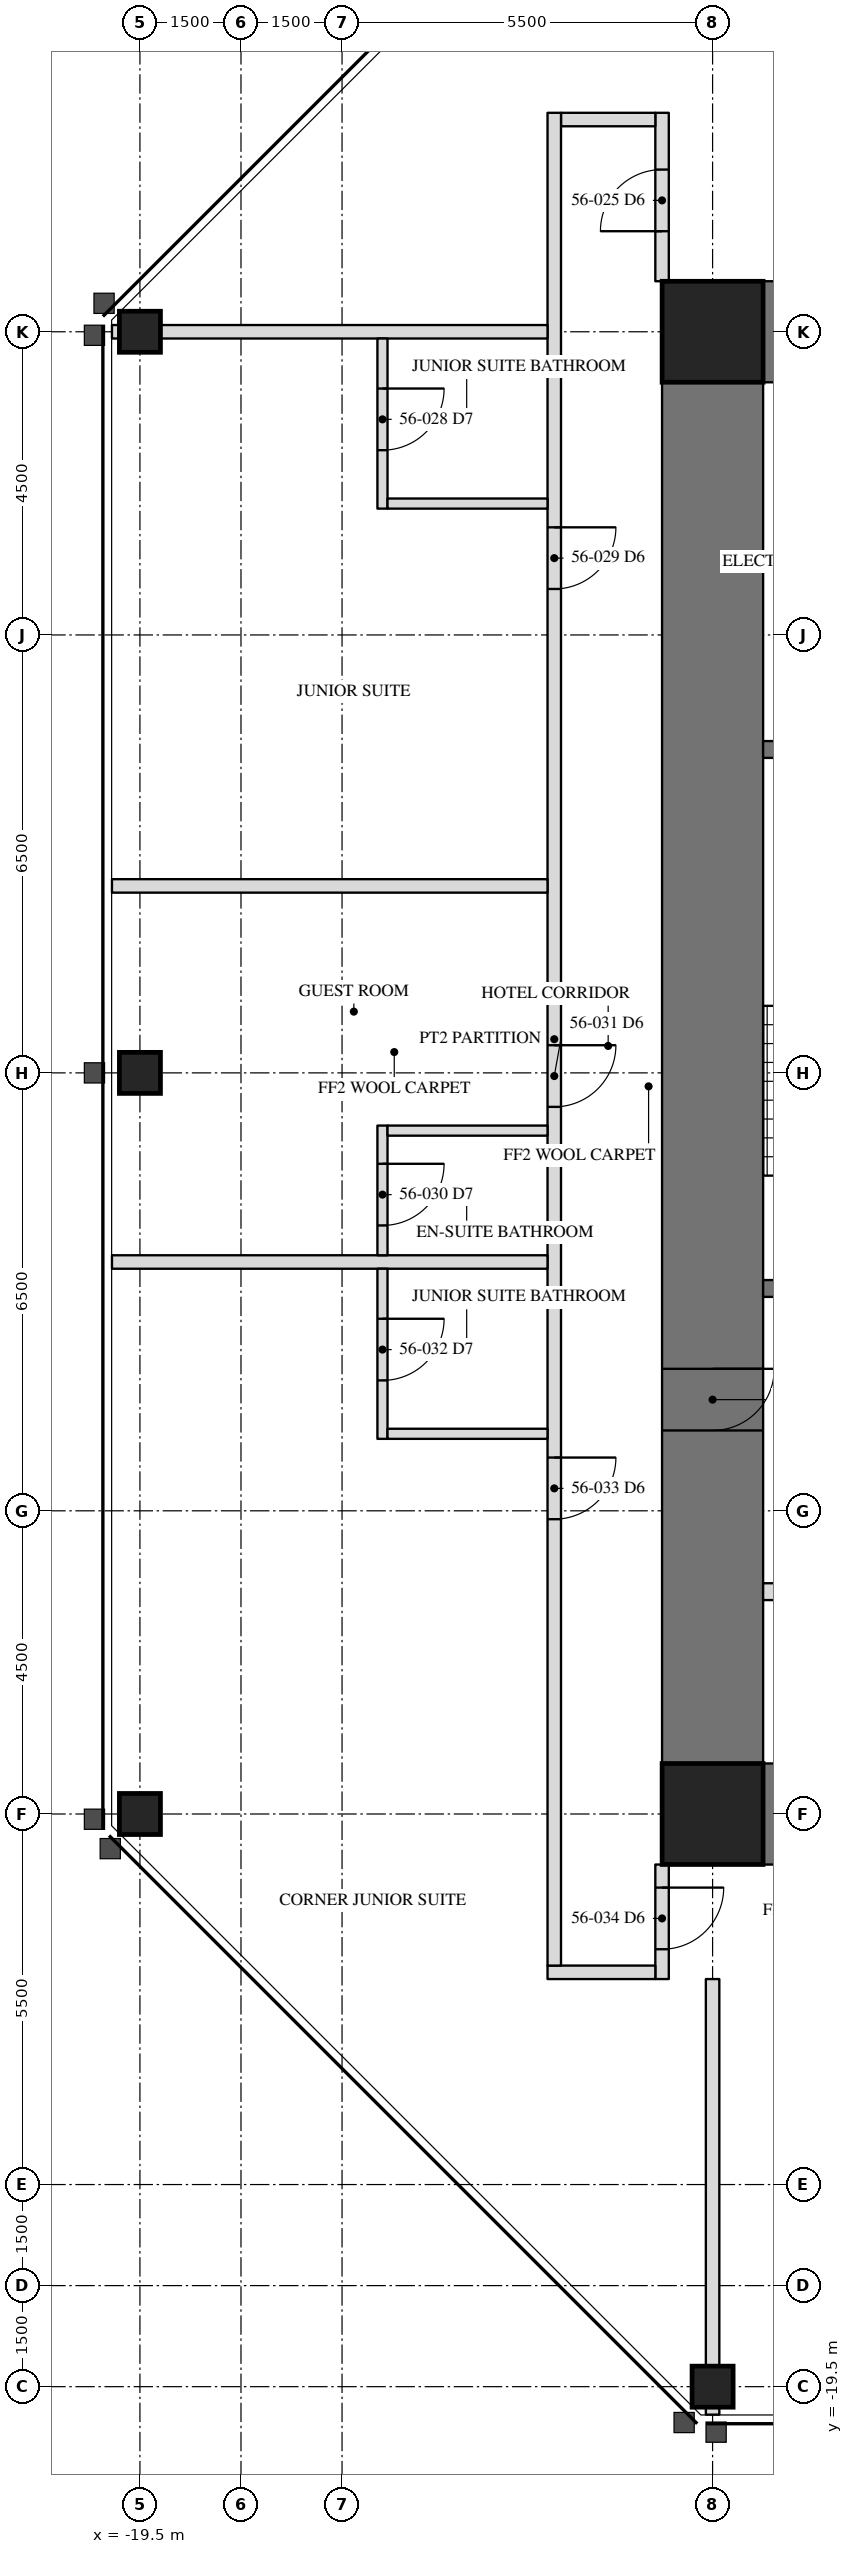
"""IFC4 building model, lengths in metres.
Left out: names, types, materials, properties, quantities, classifications, styles, units other than length and angle.
Written with IfcOpenShell. Run it as: python <this file> out.ifc"""

import sys

from ifc_helpers import new_model, si_unit, direction, frame, frame_2d, origin, origin_2d, place, context, subcontext, project, spatial, rectangle, hollow_rectangle, extrude, element, fill, save


model = new_model("IFC4")
c1 = context("Model", 3, precision=1e-05, world=origin(), true_north=direction((0.0, 1.0)))
c2 = subcontext(c1, "Body", "Model", "MODEL_VIEW")
j1 = project(units=[si_unit("LENGTHUNIT", "METRE"), si_unit("PLANEANGLEUNIT", "RADIAN")], contexts=[c1])
p1 = place(None, origin())
s1 = spatial("IfcSite", under=j1, at=p1, CompositionType="ELEMENT")
p2 = place(p1, origin())
s2 = spatial("IfcBuilding", under=s1, at=p2, CompositionType="ELEMENT")
p3 = place(p2, frame((0.0, 0.0, 232.7)))
s3 = spatial("IfcBuildingStorey", under=s2, at=p3, CompositionType="ELEMENT", Elevation=232.7)
for number, where, z_axis, x_axis in (
    (1, (-19.5, 0.0, 0.0), (0.0, 0.0, 1.0), (0.0, 1.0, 0.0)),
    (2, (-19.5, -11.0, 0.0), (0.0, 0.0, 1.0), (0.0, 1.0, 0.0)),
    (3, (-11.0, -19.5, 0.0), (0.0, 0.0, 1.0), (1.0, 0.0, 0.0)),
    (4, (-19.5, 11.0, 0.0), (0.0, 0.0, 1.0), (0.0, 1.0, 0.0)),
):
    element("IfcColumn", number, at=place(p3, frame(where, z_axis=z_axis, x_axis=x_axis)), inside=s3, PredefinedType="COLUMN", context=c2, shape_type="SweptSolid", body=[
        extrude(hollow_rectangle(XDim=0.61, YDim=0.61, WallThickness=0.076, at=origin_2d()), origin(), (0.0, 0.0, 1.0), 3.5),
    ])
p4 = place(p3, frame((-11.0, 11.0, 0.0), z_axis=(0.0, 0.0, 1.0), x_axis=(0.0, -1.0, 0.0)))
e5 = element("IfcWall", 5, at=p4, inside=s3, PredefinedType="SHEAR", context=c2, shape_type="SweptSolid", body=[
    extrude(rectangle(XDim=22.0, YDim=1.5, at=frame_2d((11.0, 0.0))), origin(), (0.0, 0.0, 1.0), 3.5),
])
p5 = place(p4, frame((15.393, 0.0, 0.0)))
e6 = element("IfcOpeningElement", 6, at=p5, cuts=e5, PredefinedType="OPENING", context=c2, shape_type="SweptSolid", body=[
    extrude(rectangle(XDim=0.915, YDim=2.134, at=frame_2d((0.458, 1.067))), frame((0.0, 0.76, 0.0), z_axis=(0.0, -1.0, 0.0), x_axis=(1.0, 0.0, 0.0)), (0.0, 0.0, 1.0), 1.52),
])
for number, where, z_axis, x_axis in (
    (7, (-6.5, 11.0, 0.0), (0.0, 0.0, 1.0), (-1.0, 0.0, 0.0)),
    (8, (-11.0, -11.0, 0.0), (0.0, 0.0, 1.0), (1.0, 0.0, 0.0)),
):
    element("IfcWall", number, at=place(p3, frame(where, z_axis=z_axis, x_axis=x_axis)), inside=s3, PredefinedType="SHEAR", context=c2, shape_type="SweptSolid", body=[
        extrude(rectangle(XDim=4.5, YDim=1.5, at=frame_2d((2.25, 0.0))), origin(), (0.0, 0.0, 1.0), 3.5),
    ])
for number, where, z_axis, x_axis in (
    (9, (-11.0, 11.0, 0.0), (0.0, 0.0, 1.0), (1.0, 0.0, 0.0)),
    (10, (-11.0, -11.0, 0.0), (0.0, 0.0, 1.0), (1.0, 0.0, 0.0)),
):
    element("IfcColumn", number, at=place(p3, frame(where, z_axis=z_axis, x_axis=x_axis)), inside=s3, PredefinedType="COLUMN", context=c2, shape_type="SweptSolid", body=[
        extrude(hollow_rectangle(XDim=1.499, YDim=1.499, WallThickness=0.102, at=origin_2d()), origin(), (0.0, 0.0, 1.0), 3.5),
    ])
p6 = place(p3, frame((-6.95, 4.8, 0.0), z_axis=(0.0, 0.0, 1.0), x_axis=(-1.0, 0.0, 0.0)))
e11 = element("IfcWall", 11, at=p6, inside=s3, PredefinedType="SOLIDWALL", context=c2, shape_type="SweptSolid", body=[
    extrude(rectangle(XDim=3.3, YDim=0.25, at=frame_2d((1.65, 0.0))), origin(), (0.0, 0.0, 1.0), 3.31),
])
p7 = place(p3, frame((-6.95, -3.2, 0.0), z_axis=(0.0, 0.0, 1.0), x_axis=(-1.0, 0.0, 0.0)))
e12 = element("IfcWall", 12, at=p7, inside=s3, PredefinedType="SOLIDWALL", context=c2, shape_type="SweptSolid", body=[
    extrude(rectangle(XDim=3.3, YDim=0.25, at=frame_2d((1.65, 0.0))), origin(), (0.0, 0.0, 1.0), 3.31),
])
p8 = place(p7, frame((1.116, 0.0, 0.0)))
e13 = element("IfcOpeningElement", 13, at=p8, cuts=e12, PredefinedType="OPENING", context=c2, shape_type="SweptSolid", body=[
    extrude(rectangle(XDim=1.067, YDim=2.134, at=frame_2d((0.533, 1.067))), frame((0.0, 0.135, 0.0), z_axis=(0.0, -1.0, 0.0), x_axis=(1.0, 0.0, 0.0)), (0.0, 0.0, 1.0), 0.27),
])
p9 = place(p3, frame((-6.95, -7.7, 0.0), z_axis=(0.0, 0.0, 1.0), x_axis=(-1.0, 0.0, 0.0)))
e14 = element("IfcWall", 14, at=p9, inside=s3, PredefinedType="PARTITIONING", context=c2, shape_type="SweptSolid", body=[
    extrude(rectangle(XDim=3.3, YDim=0.25, at=frame_2d((1.65, 0.0))), origin(), (0.0, 0.0, 1.0), 3.31),
])
p10 = place(p9, frame((0.45, 0.0, 0.0)))
e15 = element("IfcOpeningElement", 15, at=p10, cuts=e14, PredefinedType="OPENING", context=c2, shape_type="SweptSolid", body=[
    extrude(rectangle(XDim=1.219, YDim=2.134, at=frame_2d((0.609, 1.067))), frame((0.0, 0.135, 0.0), z_axis=(0.0, -1.0, 0.0), x_axis=(1.0, 0.0, 0.0)), (0.0, 0.0, 1.0), 0.27),
])
p11 = place(p3, frame((-11.75, 11.75, 0.0), z_axis=(0.0, 0.0, 1.0), x_axis=(0.0, 1.0, 0.0)))
e16 = element("IfcWall", 16, at=p11, inside=s3, PredefinedType="PARTITIONING", context=c2, shape_type="SweptSolid", body=[
    extrude(rectangle(XDim=2.5, YDim=0.2, at=frame_2d((1.25, 0.0))), origin(), (0.0, 0.0, 1.0), 3.31),
])
p12 = place(p11, frame((0.742, 0.0, 0.0)))
e17 = element("IfcOpeningElement", 17, at=p12, cuts=e16, PredefinedType="OPENING", context=c2, shape_type="SweptSolid", body=[
    extrude(rectangle(XDim=0.915, YDim=2.134, at=frame_2d((0.458, 1.067))), frame((0.0, 0.11, 0.0), z_axis=(0.0, -1.0, 0.0), x_axis=(1.0, 0.0, 0.0)), (0.0, 0.0, 1.0), 0.22),
])
p13 = place(p3, frame((-11.85, 14.15, 0.0), z_axis=(0.0, 0.0, 1.0), x_axis=(-1.0, 0.0, 0.0)))
e18 = element("IfcWall", 18, at=p13, inside=s3, PredefinedType="PARTITIONING", context=c2, shape_type="SweptSolid", body=[
    extrude(rectangle(XDim=1.4, YDim=0.2, at=frame_2d((0.7, 0.0))), origin(), (0.0, 0.0, 1.0), 3.31),
])
p14 = place(p3, frame((-11.75, -11.75, 0.0), z_axis=(0.0, 0.0, 1.0), x_axis=(0.0, -1.0, 0.0)))
e19 = element("IfcWall", 19, at=p14, inside=s3, PredefinedType="PARTITIONING", context=c2, shape_type="SweptSolid", body=[
    extrude(rectangle(XDim=1.7, YDim=0.2, at=frame_2d((0.85, 0.0))), origin(), (0.0, 0.0, 1.0), 3.31),
])
p15 = place(p14, frame((0.343, 0.0, 0.0)))
e20 = element("IfcOpeningElement", 20, at=p15, cuts=e19, PredefinedType="OPENING", context=c2, shape_type="SweptSolid", body=[
    extrude(rectangle(XDim=0.915, YDim=2.134, at=frame_2d((0.458, 1.067))), frame((0.0, 0.11, 0.0), z_axis=(0.0, -1.0, 0.0), x_axis=(1.0, 0.0, 0.0)), (0.0, 0.0, 1.0), 0.22),
])
p16 = place(p3, frame((-13.45, -13.35, 0.0), z_axis=(0.0, 0.0, 1.0), x_axis=(1.0, 0.0, 0.0)))
e21 = element("IfcWall", 21, at=p16, inside=s3, PredefinedType="PARTITIONING", context=c2, shape_type="SweptSolid", body=[
    extrude(rectangle(XDim=1.6, YDim=0.2, at=frame_2d((0.8, 0.0))), origin(), (0.0, 0.0, 1.0), 3.31),
])
p17 = place(p3, frame((-13.35, 14.25, 0.0), z_axis=(0.0, 0.0, 1.0), x_axis=(0.0, -1.0, 0.0)))
e22 = element("IfcWall", 22, at=p17, inside=s3, PredefinedType="PARTITIONING", context=c2, shape_type="SweptSolid", body=[
    extrude(rectangle(XDim=27.5, YDim=0.2, at=frame_2d((13.75, 0.0))), origin(), (0.0, 0.0, 1.0), 3.31),
])
p18 = place(p17, frame((6.153, 0.0, 0.0)))
e23 = element("IfcOpeningElement", 23, at=p18, cuts=e22, PredefinedType="OPENING", context=c2, shape_type="SweptSolid", body=[
    extrude(rectangle(XDim=0.915, YDim=2.134, at=frame_2d((0.458, 1.067))), frame((0.0, 0.11, 0.0), z_axis=(0.0, -1.0, 0.0), x_axis=(1.0, 0.0, 0.0)), (0.0, 0.0, 1.0), 0.22),
])
p19 = place(p17, frame((13.84, 0.0, 0.0)))
e24 = element("IfcOpeningElement", 24, at=p19, cuts=e22, PredefinedType="OPENING", context=c2, shape_type="SweptSolid", body=[
    extrude(rectangle(XDim=0.915, YDim=2.134, at=frame_2d((0.458, 1.067))), frame((0.0, 0.11, 0.0), z_axis=(0.0, -1.0, 0.0), x_axis=(1.0, 0.0, 0.0)), (0.0, 0.0, 1.0), 0.22),
])
p20 = place(p17, frame((19.959, 0.0, 0.0)))
e25 = element("IfcOpeningElement", 25, at=p20, cuts=e22, PredefinedType="OPENING", context=c2, shape_type="SweptSolid", body=[
    extrude(rectangle(XDim=0.915, YDim=2.134, at=frame_2d((0.458, 1.067))), frame((0.0, 0.11, 0.0), z_axis=(0.0, -1.0, 0.0), x_axis=(1.0, 0.0, 0.0)), (0.0, 0.0, 1.0), 0.22),
])
p21 = place(p3, frame((-13.45, 11.0, 0.0), z_axis=(0.0, 0.0, 1.0), x_axis=(-1.0, 0.0, 0.0)))
e26 = element("IfcWall", 26, at=p21, inside=s3, PredefinedType="PARTITIONING", context=c2, shape_type="SweptSolid", body=[
    extrude(rectangle(XDim=6.465, YDim=0.2, at=frame_2d((3.232, 0.0))), origin(), (0.0, 0.0, 1.0), 2.802),
])
for number, where, z_axis, x_axis in (
    (27, (-13.45, 2.775, 0.0), (0.0, 0.0, 1.0), (-1.0, 0.0, 0.0)),
    (28, (-13.45, -2.807, 0.0), (0.0, 0.0, 1.0), (-1.0, 0.0, 0.0)),
):
    element("IfcWall", number, at=place(p3, frame(where, z_axis=z_axis, x_axis=x_axis)), inside=s3, PredefinedType="PARTITIONING", context=c2, shape_type="SweptSolid", body=[
        extrude(rectangle(XDim=6.465, YDim=0.2, at=frame_2d((3.232, 0.0))), origin(), (0.0, 0.0, 1.0), 3.31),
    ])
p22 = place(p3, frame((-15.9, 10.9, 0.0), z_axis=(0.0, 0.0, 1.0), x_axis=(0.0, -1.0, 0.0)))
e29 = element("IfcWall", 29, at=p22, inside=s3, PredefinedType="PARTITIONING", context=c2, shape_type="SweptSolid", body=[
    extrude(rectangle(XDim=2.525, YDim=0.15, at=frame_2d((1.262, 0.0))), origin(), (0.0, 0.0, 1.0), 3.31),
])
p23 = place(p22, frame((0.742, 0.0, 0.0)))
e30 = element("IfcOpeningElement", 30, at=p23, cuts=e29, PredefinedType="OPENING", context=c2, shape_type="SweptSolid", body=[
    extrude(rectangle(XDim=0.915, YDim=2.032, at=frame_2d((0.458, 1.016))), frame((0.0, 0.085, 0.0), z_axis=(0.0, -1.0, 0.0), x_axis=(1.0, 0.0, 0.0)), (0.0, 0.0, 1.0), 0.17),
])
p24 = place(p3, frame((-13.45, 8.45, 0.0), z_axis=(0.0, 0.0, 1.0), x_axis=(-1.0, 0.0, 0.0)))
e31 = element("IfcWall", 31, at=p24, inside=s3, PredefinedType="PARTITIONING", context=c2, shape_type="SweptSolid", body=[
    extrude(rectangle(XDim=2.375, YDim=0.15, at=frame_2d((1.188, 0.0))), origin(), (0.0, 0.0, 1.0), 3.31),
])
p25 = place(p3, frame((-15.9, -0.782, 0.0), z_axis=(0.0, 0.0, 1.0), x_axis=(0.0, -1.0, 0.0)))
e32 = element("IfcWall", 32, at=p25, inside=s3, PredefinedType="PARTITIONING", context=c2, shape_type="SweptSolid", body=[
    extrude(rectangle(XDim=1.925, YDim=0.15, at=frame_2d((0.962, 0.0))), origin(), (0.0, 0.0, 1.0), 3.31),
])
p26 = place(p25, frame((0.567, 0.0, 0.0)))
e33 = element("IfcOpeningElement", 33, at=p26, cuts=e32, PredefinedType="OPENING", context=c2, shape_type="SweptSolid", body=[
    extrude(rectangle(XDim=0.915, YDim=2.032, at=frame_2d((0.458, 1.016))), frame((0.0, 0.085, 0.0), z_axis=(0.0, -1.0, 0.0), x_axis=(1.0, 0.0, 0.0)), (0.0, 0.0, 1.0), 0.17),
])
p27 = place(p3, frame((-13.45, -0.857, 0.0), z_axis=(0.0, 0.0, 1.0), x_axis=(-1.0, 0.0, 0.0)))
e34 = element("IfcWall", 34, at=p27, inside=s3, PredefinedType="PARTITIONING", context=c2, shape_type="SweptSolid", body=[
    extrude(rectangle(XDim=2.375, YDim=0.15, at=frame_2d((1.188, 0.0))), origin(), (0.0, 0.0, 1.0), 3.31),
])
p28 = place(p3, frame((-15.9, -2.907, 0.0), z_axis=(0.0, 0.0, 1.0), x_axis=(0.0, -1.0, 0.0)))
e35 = element("IfcWall", 35, at=p28, inside=s3, PredefinedType="PARTITIONING", context=c2, shape_type="SweptSolid", body=[
    extrude(rectangle(XDim=2.525, YDim=0.15, at=frame_2d((1.262, 0.0))), origin(), (0.0, 0.0, 1.0), 3.31),
])
p29 = place(p28, frame((0.742, 0.0, 0.0)))
e36 = element("IfcOpeningElement", 36, at=p29, cuts=e35, PredefinedType="OPENING", context=c2, shape_type="SweptSolid", body=[
    extrude(rectangle(XDim=0.915, YDim=2.032, at=frame_2d((0.458, 1.016))), frame((0.0, 0.085, 0.0), z_axis=(0.0, -1.0, 0.0), x_axis=(1.0, 0.0, 0.0)), (0.0, 0.0, 1.0), 0.17),
])
p30 = place(p3, frame((-13.45, -5.357, 0.0), z_axis=(0.0, 0.0, 1.0), x_axis=(-1.0, 0.0, 0.0)))
e37 = element("IfcWall", 37, at=p30, inside=s3, PredefinedType="PARTITIONING", context=c2, shape_type="SweptSolid", body=[
    extrude(rectangle(XDim=2.375, YDim=0.15, at=frame_2d((1.188, 0.0))), origin(), (0.0, 0.0, 1.0), 3.31),
])
p31 = place(p3, frame((-11.0, -13.45, 0.0), z_axis=(0.0, 0.0, 1.0), x_axis=(0.0, -1.0, 0.0)))
e38 = element("IfcWall", 38, at=p31, inside=s3, PredefinedType="PARTITIONING", context=c2, shape_type="SweptSolid", body=[
    extrude(rectangle(XDim=6.465, YDim=0.2, at=frame_2d((3.232, 0.0))), origin(), (0.0, 0.0, 1.0), 2.802),
])
p32 = place(p5, origin())
e39 = element("IfcDoor", 39, at=p32, inside=s3, OperationType="SINGLE_SWING_RIGHT", PredefinedType="DOOR", context=c2, shape_type="SweptSolid", body=[
    extrude(rectangle(XDim=0.915, YDim=2.134, at=frame_2d((0.458, 1.067))), frame((0.0, -0.675, 0.0), z_axis=(0.0, -1.0, 0.0), x_axis=(1.0, 0.0, 0.0)), (0.0, 0.0, 1.0), 0.05),
])
fill(e6, e39)
p33 = place(p12, origin())
e40 = element("IfcDoor", 40, at=p33, inside=s3, OperationType="SINGLE_SWING_LEFT", PredefinedType="DOOR", context=c2, shape_type="SweptSolid", body=[
    extrude(rectangle(XDim=0.915, YDim=2.134, at=frame_2d((0.458, 1.067))), frame((0.0, 0.025, 0.0), z_axis=(0.0, -1.0, 0.0), x_axis=(1.0, 0.0, 0.0)), (0.0, 0.0, 1.0), 0.05),
])
fill(e17, e40)
p34 = place(p23, origin())
e41 = element("IfcDoor", 41, at=p34, inside=s3, OperationType="SINGLE_SWING_LEFT", PredefinedType="DOOR", context=c2, shape_type="SweptSolid", body=[
    extrude(rectangle(XDim=0.915, YDim=2.032, at=frame_2d((0.458, 1.016))), frame((0.0, 0.025, 0.0), z_axis=(0.0, -1.0, 0.0), x_axis=(1.0, 0.0, 0.0)), (0.0, 0.0, 1.0), 0.05),
])
fill(e30, e41)
p35 = place(p18, origin())
e42 = element("IfcDoor", 42, at=p35, inside=s3, OperationType="SINGLE_SWING_LEFT", PredefinedType="DOOR", context=c2, shape_type="SweptSolid", body=[
    extrude(rectangle(XDim=0.915, YDim=2.134, at=frame_2d((0.458, 1.067))), frame((0.0, 0.025, 0.0), z_axis=(0.0, -1.0, 0.0), x_axis=(1.0, 0.0, 0.0)), (0.0, 0.0, 1.0), 0.05),
])
fill(e23, e42)
p36 = place(p26, origin())
e43 = element("IfcDoor", 43, at=p36, inside=s3, OperationType="SINGLE_SWING_LEFT", PredefinedType="DOOR", context=c2, shape_type="SweptSolid", body=[
    extrude(rectangle(XDim=0.915, YDim=2.032, at=frame_2d((0.458, 1.016))), frame((0.0, 0.025, 0.0), z_axis=(0.0, -1.0, 0.0), x_axis=(1.0, 0.0, 0.0)), (0.0, 0.0, 1.0), 0.05),
])
fill(e33, e43)
p37 = place(p19, origin())
e44 = element("IfcDoor", 44, at=p37, inside=s3, OperationType="SINGLE_SWING_LEFT", PredefinedType="DOOR", context=c2, shape_type="SweptSolid", body=[
    extrude(rectangle(XDim=0.915, YDim=2.134, at=frame_2d((0.458, 1.067))), frame((0.0, 0.025, 0.0), z_axis=(0.0, -1.0, 0.0), x_axis=(1.0, 0.0, 0.0)), (0.0, 0.0, 1.0), 0.05),
])
fill(e24, e44)
p38 = place(p29, origin())
e45 = element("IfcDoor", 45, at=p38, inside=s3, OperationType="SINGLE_SWING_LEFT", PredefinedType="DOOR", context=c2, shape_type="SweptSolid", body=[
    extrude(rectangle(XDim=0.915, YDim=2.032, at=frame_2d((0.458, 1.016))), frame((0.0, 0.025, 0.0), z_axis=(0.0, -1.0, 0.0), x_axis=(1.0, 0.0, 0.0)), (0.0, 0.0, 1.0), 0.05),
])
fill(e36, e45)
p39 = place(p20, origin())
e46 = element("IfcDoor", 46, at=p39, inside=s3, OperationType="SINGLE_SWING_LEFT", PredefinedType="DOOR", context=c2, shape_type="SweptSolid", body=[
    extrude(rectangle(XDim=0.915, YDim=2.134, at=frame_2d((0.458, 1.067))), frame((0.0, 0.025, 0.0), z_axis=(0.0, -1.0, 0.0), x_axis=(1.0, 0.0, 0.0)), (0.0, 0.0, 1.0), 0.05),
])
fill(e25, e46)
p40 = place(p15, origin())
e47 = element("IfcDoor", 47, at=p40, inside=s3, OperationType="SINGLE_SWING_LEFT", PredefinedType="DOOR", context=c2, shape_type="SweptSolid", body=[
    extrude(rectangle(XDim=0.915, YDim=2.134, at=frame_2d((0.458, 1.067))), frame((0.0, 0.025, 0.0), z_axis=(0.0, -1.0, 0.0), x_axis=(1.0, 0.0, 0.0)), (0.0, 0.0, 1.0), 0.05),
])
fill(e20, e47)
save(model, sys.argv[1])
